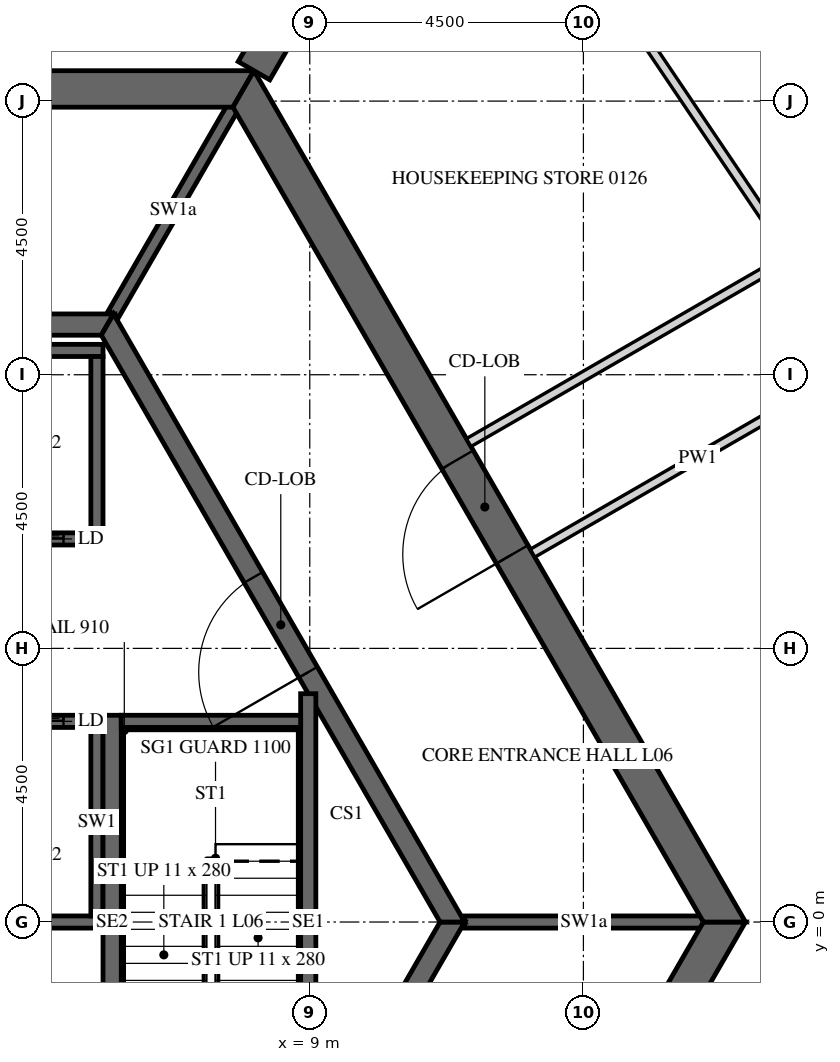
"""IFC4 building model, lengths in metres.
Left out: names, types, materials, properties, quantities, classifications, styles, units other than length and angle.
Written with IfcOpenShell. Run it as: python <this file> out.ifc"""

import sys

from ifc_helpers import new_model, si_unit, direction, frame, frame_2d, origin, place, context, subcontext, project, spatial, polyline, rectangle, outline, extrude, element, fill, save


model = new_model("IFC4")
c1 = context("Model", 3, precision=1e-05, world=origin(), true_north=direction((0.0, 1.0)))
c2 = subcontext(c1, "Body", "Model", "MODEL_VIEW")
j1 = project(units=[si_unit("LENGTHUNIT", "METRE"), si_unit("PLANEANGLEUNIT", "RADIAN")], contexts=[c1])
p1 = place(None, origin())
s1 = spatial("IfcSite", under=j1, at=p1, CompositionType="ELEMENT")
p2 = place(p1, origin())
s2 = spatial("IfcBuilding", under=s1, at=p2, CompositionType="ELEMENT")
p3 = place(p2, frame((0.0, 0.0, 37.5)))
s3 = spatial("IfcBuildingStorey", under=s2, at=p3, CompositionType="ELEMENT", Elevation=37.5)
p4 = place(p3, frame((7.91, -13.7, -0.15), z_axis=(0.0, 0.0, 1.0), x_axis=(0.499999880136, 0.866025472988, 0.0)))
e1 = element("IfcWall", 1, at=p4, inside=s3, PredefinedType="SHEAR", context=c2, shape_type="SweptSolid", body=[
    extrude(outline(polyline([(-0.173, -0.3), (15.993, -0.3), (15.646, 0.3), (0.173, 0.3), (-0.173, -0.3)])), origin(), (0.0, 0.0, 1.0), 3.9),
])
p5 = place(p4, frame((7.039, 0.0, 0.15)))
e2 = element("IfcOpeningElement", 2, at=p5, cuts=e1, PredefinedType="OPENING", context=c2, shape_type="SweptSolid", body=[
    extrude(rectangle(XDim=1.8, YDim=2.4, at=frame_2d((0.9, 1.2))), frame((0.0, 0.31, 0.0), z_axis=(0.0, -1.0, 0.0), x_axis=(1.0, 0.0, 0.0)), (0.0, 0.0, 1.0), 0.62),
])
p6 = place(p3, frame((15.819, 0.0, -0.15), z_axis=(0.0, 0.0, 1.0), x_axis=(-0.499999880136, 0.866025472988, 0.0)))
e3 = element("IfcWall", 3, at=p6, inside=s3, PredefinedType="SHEAR", context=c2, shape_type="SweptSolid", body=[
    extrude(outline(polyline([(-0.173, -0.3), (15.993, -0.3), (15.646, 0.3), (0.173, 0.3), (-0.173, -0.3)])), origin(), (0.0, 0.0, 1.0), 3.9),
])
p7 = place(p6, frame((6.981, 0.0, 0.15)))
e4 = element("IfcOpeningElement", 4, at=p7, cuts=e3, PredefinedType="OPENING", context=c2, shape_type="SweptSolid", body=[
    extrude(rectangle(XDim=1.8, YDim=2.4, at=frame_2d((0.9, 1.2))), frame((0.0, 0.31, 0.0), z_axis=(0.0, -1.0, 0.0), x_axis=(1.0, 0.0, 0.0)), (0.0, 0.0, 1.0), 0.62),
])
p8 = place(p3, frame((7.91, 13.7, -0.15), z_axis=(0.0, 0.0, 1.0), x_axis=(-1.0, 0.0, 0.0)))
e5 = element("IfcWall", 5, at=p8, inside=s3, PredefinedType="SHEAR", context=c2, shape_type="SweptSolid", body=[
    extrude(outline(polyline([(-0.173, -0.3), (15.993, -0.3), (15.646, 0.3), (0.173, 0.3), (-0.173, -0.3)])), origin(), (0.0, 0.0, 1.0), 3.9),
])
p9 = place(p8, frame((7.31, 0.0, 0.15)))
e6 = element("IfcOpeningElement", 6, at=p9, cuts=e5, PredefinedType="OPENING", context=c2, shape_type="SweptSolid", body=[
    extrude(rectangle(XDim=1.2, YDim=2.4, at=frame_2d((0.6, 1.2))), frame((0.0, 0.31, 0.0), z_axis=(0.0, -1.0, 0.0), x_axis=(1.0, 0.0, 0.0)), (0.0, 0.0, 1.0), 0.62),
])
p10 = place(p3, frame((8.083, 14.0, -0.15), z_axis=(0.0, 0.0, 1.0), x_axis=(0.499997680643, 0.866026742862, 0.0)))
e7 = element("IfcWall", 7, at=p10, inside=s3, PredefinedType="SHEAR", context=c2, shape_type="SweptSolid", body=[
    extrude(rectangle(XDim=16.509, YDim=0.6, at=frame_2d((8.254, 0.0))), origin(), (0.0, 0.0, 1.0), 3.9),
])
p11 = place(p10, frame((7.354, 0.0, 0.15)))
e8 = element("IfcOpeningElement", 8, at=p11, cuts=e7, PredefinedType="OPENING", context=c2, shape_type="SweptSolid", body=[
    extrude(rectangle(XDim=1.8, YDim=2.4, at=frame_2d((0.9, 1.2))), frame((0.0, 0.31, 0.0), z_axis=(0.0, -1.0, 0.0), x_axis=(1.0, 0.0, 0.0)), (0.0, 0.0, 1.0), 0.62),
])
p12 = place(p3, frame((5.673, -9.825, -0.15), z_axis=(0.0, 0.0, 1.0), x_axis=(0.499995046907, 0.866028263435, 0.0)))
e9 = element("IfcWall", 9, at=p12, inside=s3, PredefinedType="SHEAR", context=c2, shape_type="SweptSolid", body=[
    extrude(outline(polyline([(-0.101, -0.175), (11.446, -0.175), (11.244, 0.175), (0.101, 0.175), (-0.101, -0.175)])), origin(), (0.0, 0.0, 1.0), 3.9),
])
p13 = place(p12, frame((4.801, 0.0, 0.15)))
e10 = element("IfcOpeningElement", 10, at=p13, cuts=e9, PredefinedType="OPENING", context=c2, shape_type="SweptSolid", body=[
    extrude(rectangle(XDim=1.8, YDim=2.4, at=frame_2d((0.9, 1.2))), frame((0.0, 0.185, 0.0), z_axis=(0.0, -1.0, 0.0), x_axis=(1.0, 0.0, 0.0)), (0.0, 0.0, 1.0), 0.37),
])
p14 = place(p3, frame((11.345, 0.0, -0.15), z_axis=(0.0, 0.0, 1.0), x_axis=(-0.499995046907, 0.866028263435, 0.0)))
e11 = element("IfcWall", 11, at=p14, inside=s3, PredefinedType="SHEAR", context=c2, shape_type="SweptSolid", body=[
    extrude(outline(polyline([(-0.101, -0.175), (11.446, -0.175), (11.244, 0.175), (0.101, 0.175), (-0.101, -0.175)])), origin(), (0.0, 0.0, 1.0), 3.9),
])
p15 = place(p14, frame((4.744, 0.0, 0.15)))
e12 = element("IfcOpeningElement", 12, at=p15, cuts=e11, PredefinedType="OPENING", context=c2, shape_type="SweptSolid", body=[
    extrude(rectangle(XDim=1.8, YDim=2.4, at=frame_2d((0.9, 1.2))), frame((0.0, 0.185, 0.0), z_axis=(0.0, -1.0, 0.0), x_axis=(1.0, 0.0, 0.0)), (0.0, 0.0, 1.0), 0.37),
])
p16 = place(p3, frame((5.673, 9.825, -0.15), z_axis=(0.0, 0.0, 1.0), x_axis=(-1.0, 0.0, 0.0)))
e13 = element("IfcWall", 13, at=p16, inside=s3, PredefinedType="SHEAR", context=c2, shape_type="SweptSolid", body=[
    extrude(outline(polyline([(-0.101, -0.175), (11.446, -0.175), (11.244, 0.175), (0.101, 0.175), (-0.101, -0.175)])), origin(), (0.0, 0.0, 1.0), 3.9),
])
p17 = place(p3, frame((-5.6, 6.3, -0.25), z_axis=(0.0, 0.0, 1.0), x_axis=(1.0, 0.0, 0.0)))
e14 = element("IfcWall", 14, at=p17, inside=s3, PredefinedType="SHEAR", context=c2, shape_type="SweptSolid", body=[
    extrude(rectangle(XDim=11.2, YDim=0.2, at=frame_2d((5.6, 0.0))), origin(), (0.0, 0.0, 1.0), 3.9),
])
p18 = place(p17, frame((0.65, 0.0, 0.25)))
e15 = element("IfcOpeningElement", 15, at=p18, cuts=e14, PredefinedType="OPENING", context=c2, shape_type="SweptSolid", body=[
    extrude(rectangle(XDim=1.1, YDim=2.1, at=frame_2d((0.55, 1.05))), frame((0.0, 0.11, 0.0), z_axis=(0.0, -1.0, 0.0), x_axis=(1.0, 0.0, 0.0)), (0.0, 0.0, 1.0), 0.22),
])
p19 = place(p17, frame((2.85, 0.0, 0.25)))
e16 = element("IfcOpeningElement", 16, at=p19, cuts=e14, PredefinedType="OPENING", context=c2, shape_type="SweptSolid", body=[
    extrude(rectangle(XDim=1.1, YDim=2.1, at=frame_2d((0.55, 1.05))), frame((0.0, 0.11, 0.0), z_axis=(0.0, -1.0, 0.0), x_axis=(1.0, 0.0, 0.0)), (0.0, 0.0, 1.0), 0.22),
])
p20 = place(p17, frame((5.05, 0.0, 0.25)))
e17 = element("IfcOpeningElement", 17, at=p20, cuts=e14, PredefinedType="OPENING", context=c2, shape_type="SweptSolid", body=[
    extrude(rectangle(XDim=1.1, YDim=2.1, at=frame_2d((0.55, 1.05))), frame((0.0, 0.11, 0.0), z_axis=(0.0, -1.0, 0.0), x_axis=(1.0, 0.0, 0.0)), (0.0, 0.0, 1.0), 0.22),
])
p21 = place(p17, frame((7.25, 0.0, 0.25)))
e18 = element("IfcOpeningElement", 18, at=p21, cuts=e14, PredefinedType="OPENING", context=c2, shape_type="SweptSolid", body=[
    extrude(rectangle(XDim=1.1, YDim=2.1, at=frame_2d((0.55, 1.05))), frame((0.0, 0.11, 0.0), z_axis=(0.0, -1.0, 0.0), x_axis=(1.0, 0.0, 0.0)), (0.0, 0.0, 1.0), 0.22),
])
p22 = place(p17, frame((9.45, 0.0, 0.25)))
e19 = element("IfcOpeningElement", 19, at=p22, cuts=e14, PredefinedType="OPENING", context=c2, shape_type="SweptSolid", body=[
    extrude(rectangle(XDim=1.1, YDim=2.1, at=frame_2d((0.55, 1.05))), frame((0.0, 0.11, 0.0), z_axis=(0.0, -1.0, 0.0), x_axis=(1.0, 0.0, 0.0)), (0.0, 0.0, 1.0), 0.22),
])
p23 = place(p3, frame((-5.6, 9.4, -0.25), z_axis=(0.0, 0.0, 1.0), x_axis=(1.0, 0.0, 0.0)))
e20 = element("IfcWall", 20, at=p23, inside=s3, PredefinedType="SHEAR", context=c2, shape_type="SweptSolid", body=[
    extrude(rectangle(XDim=11.2, YDim=0.2, at=frame_2d((5.6, 0.0))), origin(), (0.0, 0.0, 1.0), 3.9),
])
p24 = place(p3, frame((5.5, 6.4, -0.25), z_axis=(0.0, 0.0, 1.0), x_axis=(0.0, 1.0, 0.0)))
e21 = element("IfcWall", 21, at=p24, inside=s3, PredefinedType="SHEAR", context=c2, shape_type="SweptSolid", body=[
    extrude(rectangle(XDim=2.9, YDim=0.2, at=frame_2d((1.45, 0.0))), origin(), (0.0, 0.0, 1.0), 3.9),
])
p25 = place(p3, frame((-5.6, 3.3, -0.25), z_axis=(0.0, 0.0, 1.0), x_axis=(1.0, 0.0, 0.0)))
e22 = element("IfcWall", 22, at=p25, inside=s3, PredefinedType="SHEAR", context=c2, shape_type="SweptSolid", body=[
    extrude(rectangle(XDim=11.2, YDim=0.2, at=frame_2d((5.6, 0.0))), origin(), (0.0, 0.0, 1.0), 3.9),
])
p26 = place(p25, frame((0.65, 0.0, 0.25)))
e23 = element("IfcOpeningElement", 23, at=p26, cuts=e22, PredefinedType="OPENING", context=c2, shape_type="SweptSolid", body=[
    extrude(rectangle(XDim=1.1, YDim=2.1, at=frame_2d((0.55, 1.05))), frame((0.0, 0.11, 0.0), z_axis=(0.0, -1.0, 0.0), x_axis=(1.0, 0.0, 0.0)), (0.0, 0.0, 1.0), 0.22),
])
p27 = place(p25, frame((2.85, 0.0, 0.25)))
e24 = element("IfcOpeningElement", 24, at=p27, cuts=e22, PredefinedType="OPENING", context=c2, shape_type="SweptSolid", body=[
    extrude(rectangle(XDim=1.1, YDim=2.1, at=frame_2d((0.55, 1.05))), frame((0.0, 0.11, 0.0), z_axis=(0.0, -1.0, 0.0), x_axis=(1.0, 0.0, 0.0)), (0.0, 0.0, 1.0), 0.22),
])
p28 = place(p25, frame((5.05, 0.0, 0.25)))
e25 = element("IfcOpeningElement", 25, at=p28, cuts=e22, PredefinedType="OPENING", context=c2, shape_type="SweptSolid", body=[
    extrude(rectangle(XDim=1.1, YDim=2.1, at=frame_2d((0.55, 1.05))), frame((0.0, 0.11, 0.0), z_axis=(0.0, -1.0, 0.0), x_axis=(1.0, 0.0, 0.0)), (0.0, 0.0, 1.0), 0.22),
])
p29 = place(p25, frame((7.25, 0.0, 0.25)))
e26 = element("IfcOpeningElement", 26, at=p29, cuts=e22, PredefinedType="OPENING", context=c2, shape_type="SweptSolid", body=[
    extrude(rectangle(XDim=1.1, YDim=2.1, at=frame_2d((0.55, 1.05))), frame((0.0, 0.11, 0.0), z_axis=(0.0, -1.0, 0.0), x_axis=(1.0, 0.0, 0.0)), (0.0, 0.0, 1.0), 0.22),
])
p30 = place(p25, frame((9.45, 0.0, 0.25)))
e27 = element("IfcOpeningElement", 27, at=p30, cuts=e22, PredefinedType="OPENING", context=c2, shape_type="SweptSolid", body=[
    extrude(rectangle(XDim=1.1, YDim=2.1, at=frame_2d((0.55, 1.05))), frame((0.0, 0.11, 0.0), z_axis=(0.0, -1.0, 0.0), x_axis=(1.0, 0.0, 0.0)), (0.0, 0.0, 1.0), 0.22),
])
p31 = place(p3, frame((-5.6, 0.0, -0.25), z_axis=(0.0, 0.0, 1.0), x_axis=(1.0, 0.0, 0.0)))
e28 = element("IfcWall", 28, at=p31, inside=s3, PredefinedType="SHEAR", context=c2, shape_type="SweptSolid", body=[
    extrude(rectangle(XDim=11.2, YDim=0.2, at=frame_2d((5.6, 0.0))), origin(), (0.0, 0.0, 1.0), 3.9),
])
p32 = place(p3, frame((5.5, 0.1, -0.25), z_axis=(0.0, 0.0, 1.0), x_axis=(0.0, 1.0, 0.0)))
e29 = element("IfcWall", 29, at=p32, inside=s3, PredefinedType="SHEAR", context=c2, shape_type="SweptSolid", body=[
    extrude(rectangle(XDim=3.1, YDim=0.2, at=frame_2d((1.55, 0.0))), origin(), (0.0, 0.0, 1.0), 3.9),
])
p33 = place(p3, frame((11.547, 0.0, -0.15), z_axis=(0.0, 0.0, 1.0), x_axis=(1.0, 0.0, 0.0)))
e30 = element("IfcWall", 30, at=p33, inside=s3, PredefinedType="SHEAR", context=c2, shape_type="SweptSolid", body=[
    extrude(rectangle(XDim=3.926, YDim=0.2, at=frame_2d((1.963, 0.0))), origin(), (0.0, 0.0, 1.0), 3.9),
])
p34 = place(p3, frame((5.773, 10.0, -0.15), z_axis=(0.0, 0.0, 1.0), x_axis=(0.500038251005, 0.86600331843, 0.0)))
e31 = element("IfcWall", 31, at=p34, inside=s3, PredefinedType="SHEAR", context=c2, shape_type="SweptSolid", body=[
    extrude(rectangle(XDim=3.926, YDim=0.2, at=frame_2d((1.963, 0.0))), origin(), (0.0, 0.0, 1.0), 3.9),
])
p35 = place(p3, frame((5.75, -3.4, -0.25), z_axis=(0.0, 0.0, 1.0), x_axis=(0.0, 1.0, 0.0)))
e32 = element("IfcWall", 32, at=p35, inside=s3, PredefinedType="SHEAR", context=c2, shape_type="SweptSolid", body=[
    extrude(rectangle(XDim=6.8, YDim=0.3, at=frame_2d((3.4, 0.0))), origin(), (0.0, 0.0, 1.0), 3.9),
])
p36 = place(p3, frame((8.975, -3.755, -0.25), z_axis=(0.0, 0.0, 1.0), x_axis=(0.0, 1.0, 0.0)))
e33 = element("IfcWall", 33, at=p36, inside=s3, PredefinedType="SHEAR", context=c2, shape_type="SweptSolid", body=[
    extrude(rectangle(XDim=7.51, YDim=0.25, at=frame_2d((3.755, 0.0))), origin(), (0.0, 0.0, 1.0), 3.9),
])
p37 = place(p3, frame((5.9, 3.3, -0.25), z_axis=(0.0, 0.0, 1.0), x_axis=(1.0, 0.0, 0.0)))
e34 = element("IfcWall", 34, at=p37, inside=s3, PredefinedType="SHEAR", context=c2, shape_type="SweptSolid", body=[
    extrude(rectangle(XDim=2.95, YDim=0.2, at=frame_2d((1.475, 0.0))), origin(), (0.0, 0.0, 1.0), 3.9),
])
p38 = place(p3, frame((13.928, -19.775, 0.0), z_axis=(0.0, 0.0, 1.0), x_axis=(0.50000450071, 0.866022805283, 0.0)))
e35 = element("IfcWall", 35, at=p38, inside=s3, PredefinedType="PARTITIONING", context=c2, shape_type="SweptSolid", body=[
    extrude(rectangle(XDim=23.877, YDim=0.15, at=frame_2d((11.938, 0.0))), origin(), (0.0, 0.0, 1.0), 2.988),
])
p39 = place(p38, frame((8.573, 0.0, 0.0)))
e36 = element("IfcOpeningElement", 36, at=p39, cuts=e35, PredefinedType="OPENING", context=c2, shape_type="SweptSolid", body=[
    extrude(rectangle(XDim=1.0, YDim=2.1, at=frame_2d((0.5, 1.05))), frame((0.0, 0.085, 0.0), z_axis=(0.0, -1.0, 0.0), x_axis=(1.0, 0.0, 0.0)), (0.0, 0.0, 1.0), 0.17),
])
p40 = place(p38, frame((13.022, 0.0, 0.0)))
e37 = element("IfcOpeningElement", 37, at=p40, cuts=e35, PredefinedType="OPENING", context=c2, shape_type="SweptSolid", body=[
    extrude(rectangle(XDim=1.0, YDim=2.1, at=frame_2d((0.5, 1.05))), frame((0.0, 0.085, 0.0), z_axis=(0.0, -1.0, 0.0), x_axis=(1.0, 0.0, 0.0)), (0.0, 0.0, 1.0), 0.17),
])
p41 = place(p38, frame((21.925, 0.0, 0.0)))
e38 = element("IfcOpeningElement", 38, at=p41, cuts=e35, PredefinedType="OPENING", context=c2, shape_type="SweptSolid", body=[
    extrude(rectangle(XDim=1.0, YDim=2.1, at=frame_2d((0.5, 1.05))), frame((0.0, 0.085, 0.0), z_axis=(0.0, -1.0, 0.0), x_axis=(1.0, 0.0, 0.0)), (0.0, 0.0, 1.0), 0.17),
])
p42 = place(p3, frame((25.821, 0.972, 0.0), z_axis=(0.0, 0.0, 1.0), x_axis=(-0.559193816298, 0.829036956845, 0.0)))
e39 = element("IfcWall", 39, at=p42, inside=s3, PredefinedType="PARTITIONING", context=c2, shape_type="SweptSolid", body=[
    extrude(rectangle(XDim=22.002, YDim=0.15, at=frame_2d((11.001, 0.0))), origin(), (0.0, 0.0, 1.0), 2.988),
])
p43 = place(p42, frame((0.869, 0.0, 0.0)))
e40 = element("IfcOpeningElement", 40, at=p43, cuts=e39, PredefinedType="OPENING", context=c2, shape_type="SweptSolid", body=[
    extrude(rectangle(XDim=1.0, YDim=2.1, at=frame_2d((0.5, 1.05))), frame((0.0, 0.085, 0.0), z_axis=(0.0, -1.0, 0.0), x_axis=(1.0, 0.0, 0.0)), (0.0, 0.0, 1.0), 0.17),
])
p44 = place(p42, frame((10.721, 0.0, 0.0)))
e41 = element("IfcOpeningElement", 41, at=p44, cuts=e39, PredefinedType="OPENING", context=c2, shape_type="SweptSolid", body=[
    extrude(rectangle(XDim=1.0, YDim=2.1, at=frame_2d((0.5, 1.05))), frame((0.0, 0.085, 0.0), z_axis=(0.0, -1.0, 0.0), x_axis=(1.0, 0.0, 0.0)), (0.0, 0.0, 1.0), 0.17),
])
p45 = place(p3, frame((12.664, 6.066, 0.0), z_axis=(0.0, 0.0, 1.0), x_axis=(0.866036561919, 0.499980673046, 0.0)))
e42 = element("IfcWall", 42, at=p45, inside=s3, PredefinedType="PARTITIONING", context=c2, shape_type="SweptSolid", body=[
    extrude(rectangle(XDim=6.275, YDim=0.15, at=frame_2d((3.137, 0.0))), origin(), (0.0, 0.0, 1.0), 2.988),
])
p46 = place(p3, frame((11.465, 19.037, 0.0), z_axis=(0.0, 0.0, 1.0), x_axis=(0.559196064773, -0.829035440221, 0.0)))
e43 = element("IfcWall", 43, at=p46, inside=s3, PredefinedType="PARTITIONING", context=c2, shape_type="SweptSolid", body=[
    extrude(rectangle(XDim=9.757, YDim=0.15, at=frame_2d((4.878, 0.0))), origin(), (0.0, 0.0, 1.0), 2.988),
])
p47 = place(p46, frame((4.428, 0.0, 0.0)))
e44 = element("IfcOpeningElement", 44, at=p47, cuts=e43, PredefinedType="OPENING", context=c2, shape_type="SweptSolid", body=[
    extrude(rectangle(XDim=0.9, YDim=2.1, at=frame_2d((0.45, 1.05))), frame((0.0, 0.085, 0.0), z_axis=(0.0, -1.0, 0.0), x_axis=(1.0, 0.0, 0.0)), (0.0, 0.0, 1.0), 0.17),
])
p48 = place(p3, frame((16.855, 10.911, 0.0), z_axis=(0.0, 0.0, 1.0), x_axis=(-0.866020343444, -0.500008764664, 0.0)))
e45 = element("IfcWall", 45, at=p48, inside=s3, PredefinedType="PARTITIONING", context=c2, shape_type="SweptSolid", body=[
    extrude(rectangle(XDim=6.053, YDim=0.15, at=frame_2d((3.026, 0.0))), origin(), (0.0, 0.0, 1.0), 2.988),
])
p49 = place(p7, origin())
e46 = element("IfcDoor", 46, at=p49, inside=s3, OperationType="DOUBLE_DOOR_SINGLE_SWING", PredefinedType="DOOR", context=c2, shape_type="SweptSolid", body=[
    extrude(rectangle(XDim=1.8, YDim=2.4, at=frame_2d((0.9, 1.2))), frame((0.0, 0.025, 0.0), z_axis=(0.0, -1.0, 0.0), x_axis=(1.0, 0.0, 0.0)), (0.0, 0.0, 1.0), 0.05),
])
fill(e4, e46)
p50 = place(p15, origin())
e47 = element("IfcDoor", 47, at=p50, inside=s3, OperationType="DOUBLE_DOOR_SINGLE_SWING", PredefinedType="DOOR", context=c2, shape_type="SweptSolid", body=[
    extrude(rectangle(XDim=1.8, YDim=2.4, at=frame_2d((0.9, 1.2))), frame((0.0, 0.025, 0.0), z_axis=(0.0, -1.0, 0.0), x_axis=(1.0, 0.0, 0.0)), (0.0, 0.0, 1.0), 0.05),
])
fill(e12, e47)
p51 = place(p22, origin())
e48 = element("IfcDoor", 48, at=p51, inside=s3, OperationType="SLIDING_TO_LEFT", PredefinedType="DOOR", context=c2, shape_type="SweptSolid", body=[
    extrude(rectangle(XDim=1.1, YDim=2.1, at=frame_2d((0.55, 1.05))), frame((0.0, 0.025, 0.0), z_axis=(0.0, -1.0, 0.0), x_axis=(1.0, 0.0, 0.0)), (0.0, 0.0, 1.0), 0.05),
])
fill(e19, e48)
p52 = place(p30, origin())
e49 = element("IfcDoor", 49, at=p52, inside=s3, OperationType="SLIDING_TO_LEFT", PredefinedType="DOOR", context=c2, shape_type="SweptSolid", body=[
    extrude(rectangle(XDim=1.1, YDim=2.1, at=frame_2d((0.55, 1.05))), frame((0.0, 0.025, 0.0), z_axis=(0.0, -1.0, 0.0), x_axis=(1.0, 0.0, 0.0)), (0.0, 0.0, 1.0), 0.05),
])
fill(e27, e49)
save(model, sys.argv[1])
